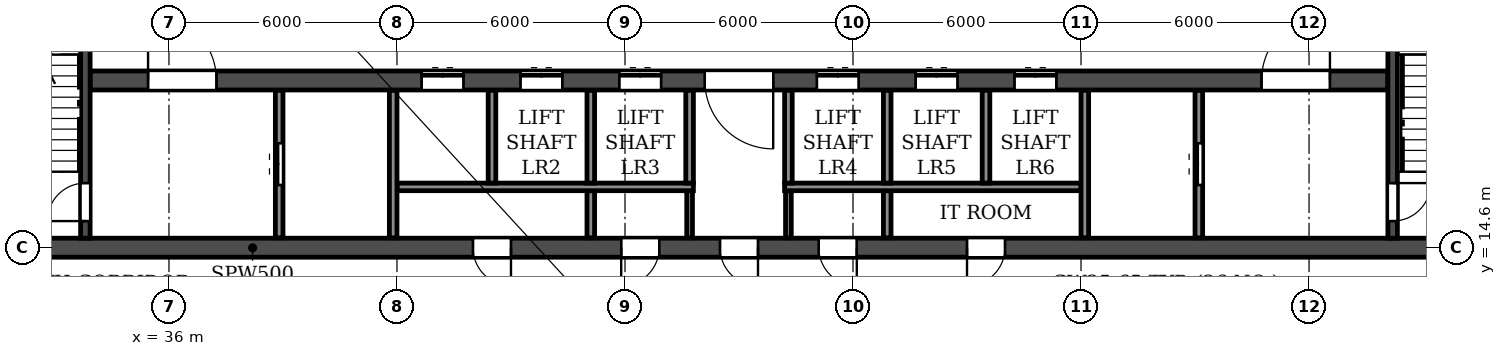
"""IFC4 building model, lengths in metres.
Left out: names, types, materials, properties, quantities, classifications, styles, units other than length and angle.
Written with IfcOpenShell. Run it as: python <this file> out.ifc"""

import sys

from ifc_helpers import new_model, si_unit, direction, frame, frame_2d, origin, place, context, subcontext, project, spatial, rectangle, extrude, element, fill, save


model = new_model("IFC4")
c1 = context("Model", 3, precision=1e-05, world=origin(), true_north=direction((0.0, 1.0)))
c2 = subcontext(c1, "Body", "Model", "MODEL_VIEW")
j1 = project(units=[si_unit("LENGTHUNIT", "METRE"), si_unit("PLANEANGLEUNIT", "RADIAN")], contexts=[c1])
p1 = place(None, origin())
s1 = spatial("IfcSite", under=j1, at=p1, CompositionType="ELEMENT")
p2 = place(p1, origin())
s2 = spatial("IfcBuilding", under=s1, at=p2, CompositionType="ELEMENT")
p3 = place(p2, frame((0.0, 0.0, 72.9)))
s3 = spatial("IfcBuildingStorey", under=s2, at=p3, CompositionType="ELEMENT", Elevation=72.9)
p4 = place(p3, frame((8.6, 14.6, 0.0), z_axis=(0.0, 0.0, 1.0), x_axis=(1.0, 0.0, 0.0)))
e1 = element("IfcWall", 1, at=p4, inside=s3, PredefinedType="SOLIDWALL", context=c2, shape_type="SweptSolid", body=[
    extrude(rectangle(XDim=84.8, YDim=0.5, at=frame_2d((42.4, 0.0))), origin(), (0.0, 0.0, 1.0), 3.06),
])
p5 = place(p4, frame((2.25, 0.0, 0.0)))
e2 = element("IfcOpeningElement", 2, at=p5, cuts=e1, PredefinedType="OPENING", context=c2, shape_type="SweptSolid", body=[
    extrude(rectangle(XDim=1.0, YDim=2.1, at=frame_2d((0.5, 1.05))), frame((0.0, 0.26, 0.0), z_axis=(0.0, -1.0, 0.0), x_axis=(1.0, 0.0, 0.0)), (0.0, 0.0, 1.0), 0.52),
])
p6 = place(p4, frame((6.95, 0.0, 0.0)))
e3 = element("IfcOpeningElement", 3, at=p6, cuts=e1, PredefinedType="OPENING", context=c2, shape_type="SweptSolid", body=[
    extrude(rectangle(XDim=1.0, YDim=2.1, at=frame_2d((0.5, 1.05))), frame((0.0, 0.26, 0.0), z_axis=(0.0, -1.0, 0.0), x_axis=(1.0, 0.0, 0.0)), (0.0, 0.0, 1.0), 0.52),
])
p7 = place(p4, frame((10.3, 0.0, 0.0)))
e4 = element("IfcOpeningElement", 4, at=p7, cuts=e1, PredefinedType="OPENING", context=c2, shape_type="SweptSolid", body=[
    extrude(rectangle(XDim=1.0, YDim=2.1, at=frame_2d((0.5, 1.05))), frame((0.0, 0.26, 0.0), z_axis=(0.0, -1.0, 0.0), x_axis=(1.0, 0.0, 0.0)), (0.0, 0.0, 1.0), 0.52),
])
p8 = place(p4, frame((18.2, 0.0, 0.0)))
e5 = element("IfcOpeningElement", 5, at=p8, cuts=e1, PredefinedType="OPENING", context=c2, shape_type="SweptSolid", body=[
    extrude(rectangle(XDim=1.0, YDim=2.1, at=frame_2d((0.5, 1.05))), frame((0.0, 0.26, 0.0), z_axis=(0.0, -1.0, 0.0), x_axis=(1.0, 0.0, 0.0)), (0.0, 0.0, 1.0), 0.52),
])
p9 = place(p4, frame((22.8, 0.0, 0.0)))
e6 = element("IfcOpeningElement", 6, at=p9, cuts=e1, PredefinedType="OPENING", context=c2, shape_type="SweptSolid", body=[
    extrude(rectangle(XDim=1.0, YDim=2.1, at=frame_2d((0.5, 1.05))), frame((0.0, 0.26, 0.0), z_axis=(0.0, -1.0, 0.0), x_axis=(1.0, 0.0, 0.0)), (0.0, 0.0, 1.0), 0.52),
])
p10 = place(p4, frame((35.4, 0.0, 0.0)))
e7 = element("IfcOpeningElement", 7, at=p10, cuts=e1, PredefinedType="OPENING", context=c2, shape_type="SweptSolid", body=[
    extrude(rectangle(XDim=1.0, YDim=2.1, at=frame_2d((0.5, 1.05))), frame((0.0, 0.26, 0.0), z_axis=(0.0, -1.0, 0.0), x_axis=(1.0, 0.0, 0.0)), (0.0, 0.0, 1.0), 0.52),
])
p11 = place(p4, frame((39.3, 0.0, 0.0)))
e8 = element("IfcOpeningElement", 8, at=p11, cuts=e1, PredefinedType="OPENING", context=c2, shape_type="SweptSolid", body=[
    extrude(rectangle(XDim=1.0, YDim=2.1, at=frame_2d((0.5, 1.05))), frame((0.0, 0.26, 0.0), z_axis=(0.0, -1.0, 0.0), x_axis=(1.0, 0.0, 0.0)), (0.0, 0.0, 1.0), 0.52),
])
p12 = place(p4, frame((41.9, 0.0, 0.0)))
e9 = element("IfcOpeningElement", 9, at=p12, cuts=e1, PredefinedType="OPENING", context=c2, shape_type="SweptSolid", body=[
    extrude(rectangle(XDim=1.0, YDim=2.1, at=frame_2d((0.5, 1.05))), frame((0.0, 0.26, 0.0), z_axis=(0.0, -1.0, 0.0), x_axis=(1.0, 0.0, 0.0)), (0.0, 0.0, 1.0), 0.52),
])
p13 = place(p4, frame((44.5, 0.0, 0.0)))
e10 = element("IfcOpeningElement", 10, at=p13, cuts=e1, PredefinedType="OPENING", context=c2, shape_type="SweptSolid", body=[
    extrude(rectangle(XDim=1.0, YDim=2.1, at=frame_2d((0.5, 1.05))), frame((0.0, 0.26, 0.0), z_axis=(0.0, -1.0, 0.0), x_axis=(1.0, 0.0, 0.0)), (0.0, 0.0, 1.0), 0.52),
])
p14 = place(p4, frame((48.4, 0.0, 0.0)))
e11 = element("IfcOpeningElement", 11, at=p14, cuts=e1, PredefinedType="OPENING", context=c2, shape_type="SweptSolid", body=[
    extrude(rectangle(XDim=1.0, YDim=2.1, at=frame_2d((0.5, 1.05))), frame((0.0, 0.26, 0.0), z_axis=(0.0, -1.0, 0.0), x_axis=(1.0, 0.0, 0.0)), (0.0, 0.0, 1.0), 0.52),
])
p15 = place(p4, frame((61.0, 0.0, 0.0)))
e12 = element("IfcOpeningElement", 12, at=p15, cuts=e1, PredefinedType="OPENING", context=c2, shape_type="SweptSolid", body=[
    extrude(rectangle(XDim=1.0, YDim=2.1, at=frame_2d((0.5, 1.05))), frame((0.0, 0.26, 0.0), z_axis=(0.0, -1.0, 0.0), x_axis=(1.0, 0.0, 0.0)), (0.0, 0.0, 1.0), 0.52),
])
p16 = place(p4, frame((65.6, 0.0, 0.0)))
e13 = element("IfcOpeningElement", 13, at=p16, cuts=e1, PredefinedType="OPENING", context=c2, shape_type="SweptSolid", body=[
    extrude(rectangle(XDim=1.0, YDim=2.1, at=frame_2d((0.5, 1.05))), frame((0.0, 0.26, 0.0), z_axis=(0.0, -1.0, 0.0), x_axis=(1.0, 0.0, 0.0)), (0.0, 0.0, 1.0), 0.52),
])
p17 = place(p4, frame((73.5, 0.0, 0.0)))
e14 = element("IfcOpeningElement", 14, at=p17, cuts=e1, PredefinedType="OPENING", context=c2, shape_type="SweptSolid", body=[
    extrude(rectangle(XDim=1.0, YDim=2.1, at=frame_2d((0.5, 1.05))), frame((0.0, 0.26, 0.0), z_axis=(0.0, -1.0, 0.0), x_axis=(1.0, 0.0, 0.0)), (0.0, 0.0, 1.0), 0.52),
])
p18 = place(p4, frame((76.55, 0.0, 0.0)))
e15 = element("IfcOpeningElement", 15, at=p18, cuts=e1, PredefinedType="OPENING", context=c2, shape_type="SweptSolid", body=[
    extrude(rectangle(XDim=1.0, YDim=2.1, at=frame_2d((0.5, 1.05))), frame((0.0, 0.26, 0.0), z_axis=(0.0, -1.0, 0.0), x_axis=(1.0, 0.0, 0.0)), (0.0, 0.0, 1.0), 0.52),
])
p19 = place(p4, frame((81.0, 0.0, 0.0)))
e16 = element("IfcOpeningElement", 16, at=p19, cuts=e1, PredefinedType="OPENING", context=c2, shape_type="SweptSolid", body=[
    extrude(rectangle(XDim=1.5, YDim=2.1, at=frame_2d((0.75, 1.05))), frame((0.0, 0.26, 0.0), z_axis=(0.0, -1.0, 0.0), x_axis=(1.0, 0.0, 0.0)), (0.0, 0.0, 1.0), 0.52),
])
p20 = place(p3, frame((33.925, 19.0, 0.0), z_axis=(0.0, 0.0, 1.0), x_axis=(1.0, 0.0, 0.0)))
e17 = element("IfcWall", 17, at=p20, inside=s3, PredefinedType="SOLIDWALL", context=c2, shape_type="SweptSolid", body=[
    extrude(rectangle(XDim=34.15, YDim=0.5, at=frame_2d((17.075, 0.0))), origin(), (0.0, 0.0, 1.0), 3.06),
])
p21 = place(p20, frame((16.175, 0.0, 0.0)))
e18 = element("IfcOpeningElement", 18, at=p21, cuts=e17, PredefinedType="OPENING", context=c2, shape_type="SweptSolid", body=[
    extrude(rectangle(XDim=1.8, YDim=2.1, at=frame_2d((0.9, 1.05))), frame((0.0, 0.26, 0.0), z_axis=(0.0, -1.0, 0.0), x_axis=(1.0, 0.0, 0.0)), (0.0, 0.0, 1.0), 0.52),
])
p22 = place(p20, frame((1.525, 0.0, 0.0)))
e19 = element("IfcOpeningElement", 19, at=p22, cuts=e17, PredefinedType="OPENING", context=c2, shape_type="SweptSolid", body=[
    extrude(rectangle(XDim=1.8, YDim=2.1, at=frame_2d((0.9, 1.05))), frame((0.0, 0.26, 0.0), z_axis=(0.0, -1.0, 0.0), x_axis=(1.0, 0.0, 0.0)), (0.0, 0.0, 1.0), 0.52),
])
p23 = place(p20, frame((8.725, 0.0, 0.0)))
e20 = element("IfcOpeningElement", 20, at=p23, cuts=e17, PredefinedType="OPENING", context=c2, shape_type="SweptSolid", body=[
    extrude(rectangle(XDim=1.1, YDim=2.1, at=frame_2d((0.55, 1.05))), frame((0.0, 0.26, 0.0), z_axis=(0.0, -1.0, 0.0), x_axis=(1.0, 0.0, 0.0)), (0.0, 0.0, 1.0), 0.52),
])
p24 = place(p20, frame((11.325, 0.0, 0.0)))
e21 = element("IfcOpeningElement", 21, at=p24, cuts=e17, PredefinedType="OPENING", context=c2, shape_type="SweptSolid", body=[
    extrude(rectangle(XDim=1.1, YDim=2.1, at=frame_2d((0.55, 1.05))), frame((0.0, 0.26, 0.0), z_axis=(0.0, -1.0, 0.0), x_axis=(1.0, 0.0, 0.0)), (0.0, 0.0, 1.0), 0.52),
])
p25 = place(p20, frame((13.925, 0.0, 0.0)))
e22 = element("IfcOpeningElement", 22, at=p25, cuts=e17, PredefinedType="OPENING", context=c2, shape_type="SweptSolid", body=[
    extrude(rectangle(XDim=1.1, YDim=2.1, at=frame_2d((0.55, 1.05))), frame((0.0, 0.26, 0.0), z_axis=(0.0, -1.0, 0.0), x_axis=(1.0, 0.0, 0.0)), (0.0, 0.0, 1.0), 0.52),
])
p26 = place(p20, frame((19.125, 0.0, 0.0)))
e23 = element("IfcOpeningElement", 23, at=p26, cuts=e17, PredefinedType="OPENING", context=c2, shape_type="SweptSolid", body=[
    extrude(rectangle(XDim=1.1, YDim=2.1, at=frame_2d((0.55, 1.05))), frame((0.0, 0.26, 0.0), z_axis=(0.0, -1.0, 0.0), x_axis=(1.0, 0.0, 0.0)), (0.0, 0.0, 1.0), 0.52),
])
p27 = place(p20, frame((21.725, 0.0, 0.0)))
e24 = element("IfcOpeningElement", 24, at=p27, cuts=e17, PredefinedType="OPENING", context=c2, shape_type="SweptSolid", body=[
    extrude(rectangle(XDim=1.1, YDim=2.1, at=frame_2d((0.55, 1.05))), frame((0.0, 0.26, 0.0), z_axis=(0.0, -1.0, 0.0), x_axis=(1.0, 0.0, 0.0)), (0.0, 0.0, 1.0), 0.52),
])
p28 = place(p20, frame((24.325, 0.0, 0.0)))
e25 = element("IfcOpeningElement", 25, at=p28, cuts=e17, PredefinedType="OPENING", context=c2, shape_type="SweptSolid", body=[
    extrude(rectangle(XDim=1.1, YDim=2.1, at=frame_2d((0.55, 1.05))), frame((0.0, 0.26, 0.0), z_axis=(0.0, -1.0, 0.0), x_axis=(1.0, 0.0, 0.0)), (0.0, 0.0, 1.0), 0.52),
])
p29 = place(p20, frame((30.825, 0.0, 0.0)))
e26 = element("IfcOpeningElement", 26, at=p29, cuts=e17, PredefinedType="OPENING", context=c2, shape_type="SweptSolid", body=[
    extrude(rectangle(XDim=1.8, YDim=2.1, at=frame_2d((0.9, 1.05))), frame((0.0, 0.26, 0.0), z_axis=(0.0, -1.0, 0.0), x_axis=(1.0, 0.0, 0.0)), (0.0, 0.0, 1.0), 0.52),
])
p30 = place(p3, frame((33.8, 14.85, 0.0), z_axis=(0.0, 0.0, 1.0), x_axis=(0.0, 1.0, 0.0)))
e27 = element("IfcWall", 27, at=p30, inside=s3, PredefinedType="SOLIDWALL", context=c2, shape_type="SweptSolid", body=[
    extrude(rectangle(XDim=7.625, YDim=0.25, at=frame_2d((3.812, 0.0))), origin(), (0.0, 0.0, 1.0), 3.06),
])
p31 = place(p30, frame((0.45, 0.0, 0.0)))
e28 = element("IfcOpeningElement", 28, at=p31, cuts=e27, PredefinedType="OPENING", context=c2, shape_type="SweptSolid", body=[
    extrude(rectangle(XDim=1.0, YDim=2.1, at=frame_2d((0.5, 1.05))), frame((0.0, 0.135, 0.0), z_axis=(0.0, -1.0, 0.0), x_axis=(1.0, 0.0, 0.0)), (0.0, 0.0, 1.0), 0.27),
])
p32 = place(p3, frame((68.2, 14.85, 0.0), z_axis=(0.0, 0.0, 1.0), x_axis=(0.0, 1.0, 0.0)))
e29 = element("IfcWall", 29, at=p32, inside=s3, PredefinedType="SOLIDWALL", context=c2, shape_type="SweptSolid", body=[
    extrude(rectangle(XDim=7.625, YDim=0.25, at=frame_2d((3.812, 0.0))), origin(), (0.0, 0.0, 1.0), 3.06),
])
p33 = place(p32, frame((0.45, 0.0, 0.0)))
e30 = element("IfcOpeningElement", 30, at=p33, cuts=e29, PredefinedType="OPENING", context=c2, shape_type="SweptSolid", body=[
    extrude(rectangle(XDim=1.0, YDim=2.1, at=frame_2d((0.5, 1.05))), frame((0.0, 0.135, 0.0), z_axis=(0.0, -1.0, 0.0), x_axis=(1.0, 0.0, 0.0)), (0.0, 0.0, 1.0), 0.27),
])
for number, where, z_axis, x_axis in (
    (31, (49.7, 14.86, 0.0), (0.0, 0.0, 1.0), (0.0, 1.0, 0.0)),
    (32, (52.3, 14.86, 0.0), (0.0, 0.0, 1.0), (0.0, 1.0, 0.0)),
):
    element("IfcWall", number, at=place(p3, frame(where, z_axis=z_axis, x_axis=x_axis)), inside=s3, PredefinedType="PARTITIONING", context=c2, shape_type="SweptSolid", body=[
        extrude(rectangle(XDim=1.24, YDim=0.15, at=frame_2d((0.62, 0.0))), origin(), (0.0, 0.0, 1.0), 3.06),
    ])
for number, where, z_axis, x_axis in (
    (33, (47.1, 14.86, 0.0), (0.0, 0.0, 1.0), (0.0, 1.0, 0.0)),
    (34, (54.9, 14.86, 0.0), (0.0, 0.0, 1.0), (0.0, 1.0, 0.0)),
):
    element("IfcWall", number, at=place(p3, frame(where, z_axis=z_axis, x_axis=x_axis)), inside=s3, PredefinedType="PARTITIONING", context=c2, shape_type="SweptSolid", body=[
        extrude(rectangle(XDim=1.24, YDim=0.2, at=frame_2d((0.62, 0.0))), origin(), (0.0, 0.0, 1.0), 3.06),
    ])
for number, where, z_axis, x_axis in (
    (35, (42.0, 16.2, 0.0), (0.0, 0.0, 1.0), (1.0, 0.0, 0.0)),
    (36, (52.2, 16.2, 0.0), (0.0, 0.0, 1.0), (1.0, 0.0, 0.0)),
):
    element("IfcWall", number, at=place(p3, frame(where, z_axis=z_axis, x_axis=x_axis)), inside=s3, PredefinedType="PARTITIONING", context=c2, shape_type="SweptSolid", body=[
        extrude(rectangle(XDim=7.8, YDim=0.2, at=frame_2d((3.9, 0.0))), origin(), (0.0, 0.0, 1.0), 3.06),
    ])
p34 = place(p3, frame((38.9, 14.86, 0.0), z_axis=(0.0, 0.0, 1.0), x_axis=(0.0, 1.0, 0.0)))
e37 = element("IfcWall", 37, at=p34, inside=s3, PredefinedType="PARTITIONING", context=c2, shape_type="SweptSolid", body=[
    extrude(rectangle(XDim=3.88, YDim=0.2, at=frame_2d((1.94, 0.0))), origin(), (0.0, 0.0, 1.0), 3.06),
])
p35 = place(p34, frame((1.39, 0.0, 0.0)))
e38 = element("IfcOpeningElement", 38, at=p35, cuts=e37, PredefinedType="OPENING", context=c2, shape_type="SweptSolid", body=[
    extrude(rectangle(XDim=1.1, YDim=2.1, at=frame_2d((0.55, 1.05))), frame((0.0, 0.11, 0.0), z_axis=(0.0, -1.0, 0.0), x_axis=(1.0, 0.0, 0.0)), (0.0, 0.0, 1.0), 0.22),
])
p36 = place(p3, frame((41.9, 14.86, 0.0), z_axis=(0.0, 0.0, 1.0), x_axis=(0.0, 1.0, 0.0)))
e39 = element("IfcWall", 39, at=p36, inside=s3, PredefinedType="PARTITIONING", context=c2, shape_type="SweptSolid", body=[
    extrude(rectangle(XDim=3.88, YDim=0.2, at=frame_2d((1.94, 0.0))), origin(), (0.0, 0.0, 1.0), 3.06),
])
for number, where, z_axis, x_axis in (
    (40, (44.5, 16.3, 0.0), (0.0, 0.0, 1.0), (0.0, 1.0, 0.0)),
    (41, (47.1, 16.3, 0.0), (0.0, 0.0, 1.0), (0.0, 1.0, 0.0)),
    (42, (49.7, 16.3, 0.0), (0.0, 0.0, 1.0), (0.0, 1.0, 0.0)),
    (43, (52.3, 16.3, 0.0), (0.0, 0.0, 1.0), (0.0, 1.0, 0.0)),
    (44, (54.9, 16.3, 0.0), (0.0, 0.0, 1.0), (0.0, 1.0, 0.0)),
    (45, (57.5, 16.3, 0.0), (0.0, 0.0, 1.0), (0.0, 1.0, 0.0)),
):
    element("IfcWall", number, at=place(p3, frame(where, z_axis=z_axis, x_axis=x_axis)), inside=s3, PredefinedType="PARTITIONING", context=c2, shape_type="SweptSolid", body=[
        extrude(rectangle(XDim=2.44, YDim=0.2, at=frame_2d((1.22, 0.0))), origin(), (0.0, 0.0, 1.0), 3.06),
    ])
p37 = place(p3, frame((60.1, 14.86, 0.0), z_axis=(0.0, 0.0, 1.0), x_axis=(0.0, 1.0, 0.0)))
e46 = element("IfcWall", 46, at=p37, inside=s3, PredefinedType="PARTITIONING", context=c2, shape_type="SweptSolid", body=[
    extrude(rectangle(XDim=3.88, YDim=0.2, at=frame_2d((1.94, 0.0))), origin(), (0.0, 0.0, 1.0), 3.06),
])
p38 = place(p3, frame((63.1, 14.86, 0.0), z_axis=(0.0, 0.0, 1.0), x_axis=(0.0, 1.0, 0.0)))
e47 = element("IfcWall", 47, at=p38, inside=s3, PredefinedType="PARTITIONING", context=c2, shape_type="SweptSolid", body=[
    extrude(rectangle(XDim=3.88, YDim=0.2, at=frame_2d((1.94, 0.0))), origin(), (0.0, 0.0, 1.0), 3.06),
])
p39 = place(p38, frame((1.39, 0.0, 0.0)))
e48 = element("IfcOpeningElement", 48, at=p39, cuts=e47, PredefinedType="OPENING", context=c2, shape_type="SweptSolid", body=[
    extrude(rectangle(XDim=1.1, YDim=2.1, at=frame_2d((0.55, 1.05))), frame((0.0, 0.11, 0.0), z_axis=(0.0, -1.0, 0.0), x_axis=(1.0, 0.0, 0.0)), (0.0, 0.0, 1.0), 0.22),
])
p40 = place(p10, frame((1.0, 0.0, 0.0), z_axis=(0.0, 0.0, 1.0), x_axis=(-1.0, 0.0, 0.0)))
e49 = element("IfcDoor", 49, at=p40, inside=s3, OperationType="SINGLE_SWING_LEFT", PredefinedType="DOOR", context=c2, shape_type="SweptSolid", body=[
    extrude(rectangle(XDim=1.0, YDim=2.1, at=frame_2d((0.5, 1.05))), frame((0.0, 0.025, 0.0), z_axis=(0.0, -1.0, 0.0), x_axis=(1.0, 0.0, 0.0)), (0.0, 0.0, 1.0), 0.05),
])
fill(e7, e49)
p41 = place(p11, frame((1.0, 0.0, 0.0), z_axis=(0.0, 0.0, 1.0), x_axis=(-1.0, 0.0, 0.0)))
e50 = element("IfcDoor", 50, at=p41, inside=s3, OperationType="SINGLE_SWING_RIGHT", PredefinedType="DOOR", context=c2, shape_type="SweptSolid", body=[
    extrude(rectangle(XDim=1.0, YDim=2.1, at=frame_2d((0.5, 1.05))), frame((0.0, 0.025, 0.0), z_axis=(0.0, -1.0, 0.0), x_axis=(1.0, 0.0, 0.0)), (0.0, 0.0, 1.0), 0.05),
])
fill(e8, e50)
p42 = place(p12, frame((1.0, 0.0, 0.0), z_axis=(0.0, 0.0, 1.0), x_axis=(-1.0, 0.0, 0.0)))
e51 = element("IfcDoor", 51, at=p42, inside=s3, OperationType="SINGLE_SWING_LEFT", PredefinedType="DOOR", context=c2, shape_type="SweptSolid", body=[
    extrude(rectangle(XDim=1.0, YDim=2.1, at=frame_2d((0.5, 1.05))), frame((0.0, 0.025, 0.0), z_axis=(0.0, -1.0, 0.0), x_axis=(1.0, 0.0, 0.0)), (0.0, 0.0, 1.0), 0.05),
])
fill(e9, e51)
p43 = place(p13, frame((1.0, 0.0, 0.0), z_axis=(0.0, 0.0, 1.0), x_axis=(-1.0, 0.0, 0.0)))
e52 = element("IfcDoor", 52, at=p43, inside=s3, OperationType="SINGLE_SWING_LEFT", PredefinedType="DOOR", context=c2, shape_type="SweptSolid", body=[
    extrude(rectangle(XDim=1.0, YDim=2.1, at=frame_2d((0.5, 1.05))), frame((0.0, 0.025, 0.0), z_axis=(0.0, -1.0, 0.0), x_axis=(1.0, 0.0, 0.0)), (0.0, 0.0, 1.0), 0.05),
])
fill(e10, e52)
p44 = place(p14, frame((1.0, 0.0, 0.0), z_axis=(0.0, 0.0, 1.0), x_axis=(-1.0, 0.0, 0.0)))
e53 = element("IfcDoor", 53, at=p44, inside=s3, OperationType="SINGLE_SWING_RIGHT", PredefinedType="DOOR", context=c2, shape_type="SweptSolid", body=[
    extrude(rectangle(XDim=1.0, YDim=2.1, at=frame_2d((0.5, 1.05))), frame((0.0, 0.025, 0.0), z_axis=(0.0, -1.0, 0.0), x_axis=(1.0, 0.0, 0.0)), (0.0, 0.0, 1.0), 0.05),
])
fill(e11, e53)
p45 = place(p39, origin())
e54 = element("IfcDoor", 54, at=p45, inside=s3, OperationType="DOUBLE_DOOR_SLIDING", PredefinedType="DOOR", context=c2, shape_type="SweptSolid", body=[
    extrude(rectangle(XDim=1.1, YDim=2.1, at=frame_2d((0.55, 1.05))), frame((0.0, 0.025, 0.0), z_axis=(0.0, -1.0, 0.0), x_axis=(1.0, 0.0, 0.0)), (0.0, 0.0, 1.0), 0.05),
])
fill(e48, e54)
p46 = place(p33, frame((1.0, 0.0, 0.0), z_axis=(0.0, 0.0, 1.0), x_axis=(-1.0, 0.0, 0.0)))
e55 = element("IfcDoor", 55, at=p46, inside=s3, OperationType="SINGLE_SWING_LEFT", PredefinedType="DOOR", context=c2, shape_type="SweptSolid", body=[
    extrude(rectangle(XDim=1.0, YDim=2.1, at=frame_2d((0.5, 1.05))), frame((0.0, 0.025, 0.0), z_axis=(0.0, -1.0, 0.0), x_axis=(1.0, 0.0, 0.0)), (0.0, 0.0, 1.0), 0.05),
])
fill(e30, e55)
p47 = place(p31, origin())
e56 = element("IfcDoor", 56, at=p47, inside=s3, OperationType="SINGLE_SWING_LEFT", PredefinedType="DOOR", context=c2, shape_type="SweptSolid", body=[
    extrude(rectangle(XDim=1.0, YDim=2.1, at=frame_2d((0.5, 1.05))), frame((0.0, 0.025, 0.0), z_axis=(0.0, -1.0, 0.0), x_axis=(1.0, 0.0, 0.0)), (0.0, 0.0, 1.0), 0.05),
])
fill(e28, e56)
p48 = place(p35, origin())
e57 = element("IfcDoor", 57, at=p48, inside=s3, OperationType="DOUBLE_DOOR_SLIDING", PredefinedType="DOOR", context=c2, shape_type="SweptSolid", body=[
    extrude(rectangle(XDim=1.1, YDim=2.1, at=frame_2d((0.55, 1.05))), frame((0.0, 0.025, 0.0), z_axis=(0.0, -1.0, 0.0), x_axis=(1.0, 0.0, 0.0)), (0.0, 0.0, 1.0), 0.05),
])
fill(e38, e57)
p49 = place(p21, frame((1.8, 0.0, 0.0), z_axis=(0.0, 0.0, 1.0), x_axis=(-1.0, 0.0, 0.0)))
e58 = element("IfcDoor", 58, at=p49, inside=s3, OperationType="DOUBLE_DOOR_SINGLE_SWING", PredefinedType="DOOR", context=c2, shape_type="SweptSolid", body=[
    extrude(rectangle(XDim=1.8, YDim=2.1, at=frame_2d((0.9, 1.05))), frame((0.0, 0.025, 0.0), z_axis=(0.0, -1.0, 0.0), x_axis=(1.0, 0.0, 0.0)), (0.0, 0.0, 1.0), 0.05),
])
fill(e18, e58)
p50 = place(p22, origin())
e59 = element("IfcDoor", 59, at=p50, inside=s3, OperationType="DOUBLE_DOOR_SINGLE_SWING", PredefinedType="DOOR", context=c2, shape_type="SweptSolid", body=[
    extrude(rectangle(XDim=1.8, YDim=2.1, at=frame_2d((0.9, 1.05))), frame((0.0, 0.025, 0.0), z_axis=(0.0, -1.0, 0.0), x_axis=(1.0, 0.0, 0.0)), (0.0, 0.0, 1.0), 0.05),
])
fill(e19, e59)
p51 = place(p23, origin())
e60 = element("IfcDoor", 60, at=p51, inside=s3, OperationType="DOUBLE_DOOR_SLIDING", PredefinedType="DOOR", context=c2, shape_type="SweptSolid", body=[
    extrude(rectangle(XDim=1.1, YDim=2.1, at=frame_2d((0.55, 1.05))), frame((0.0, 0.025, 0.0), z_axis=(0.0, -1.0, 0.0), x_axis=(1.0, 0.0, 0.0)), (0.0, 0.0, 1.0), 0.05),
])
fill(e20, e60)
p52 = place(p24, origin())
e61 = element("IfcDoor", 61, at=p52, inside=s3, OperationType="DOUBLE_DOOR_SLIDING", PredefinedType="DOOR", context=c2, shape_type="SweptSolid", body=[
    extrude(rectangle(XDim=1.1, YDim=2.1, at=frame_2d((0.55, 1.05))), frame((0.0, 0.025, 0.0), z_axis=(0.0, -1.0, 0.0), x_axis=(1.0, 0.0, 0.0)), (0.0, 0.0, 1.0), 0.05),
])
fill(e21, e61)
p53 = place(p25, origin())
e62 = element("IfcDoor", 62, at=p53, inside=s3, OperationType="DOUBLE_DOOR_SLIDING", PredefinedType="DOOR", context=c2, shape_type="SweptSolid", body=[
    extrude(rectangle(XDim=1.1, YDim=2.1, at=frame_2d((0.55, 1.05))), frame((0.0, 0.025, 0.0), z_axis=(0.0, -1.0, 0.0), x_axis=(1.0, 0.0, 0.0)), (0.0, 0.0, 1.0), 0.05),
])
fill(e22, e62)
p54 = place(p26, origin())
e63 = element("IfcDoor", 63, at=p54, inside=s3, OperationType="DOUBLE_DOOR_SLIDING", PredefinedType="DOOR", context=c2, shape_type="SweptSolid", body=[
    extrude(rectangle(XDim=1.1, YDim=2.1, at=frame_2d((0.55, 1.05))), frame((0.0, 0.025, 0.0), z_axis=(0.0, -1.0, 0.0), x_axis=(1.0, 0.0, 0.0)), (0.0, 0.0, 1.0), 0.05),
])
fill(e23, e63)
p55 = place(p27, origin())
e64 = element("IfcDoor", 64, at=p55, inside=s3, OperationType="DOUBLE_DOOR_SLIDING", PredefinedType="DOOR", context=c2, shape_type="SweptSolid", body=[
    extrude(rectangle(XDim=1.1, YDim=2.1, at=frame_2d((0.55, 1.05))), frame((0.0, 0.025, 0.0), z_axis=(0.0, -1.0, 0.0), x_axis=(1.0, 0.0, 0.0)), (0.0, 0.0, 1.0), 0.05),
])
fill(e24, e64)
p56 = place(p28, origin())
e65 = element("IfcDoor", 65, at=p56, inside=s3, OperationType="DOUBLE_DOOR_SLIDING", PredefinedType="DOOR", context=c2, shape_type="SweptSolid", body=[
    extrude(rectangle(XDim=1.1, YDim=2.1, at=frame_2d((0.55, 1.05))), frame((0.0, 0.025, 0.0), z_axis=(0.0, -1.0, 0.0), x_axis=(1.0, 0.0, 0.0)), (0.0, 0.0, 1.0), 0.05),
])
fill(e25, e65)
p57 = place(p29, origin())
e66 = element("IfcDoor", 66, at=p57, inside=s3, OperationType="DOUBLE_DOOR_SINGLE_SWING", PredefinedType="DOOR", context=c2, shape_type="SweptSolid", body=[
    extrude(rectangle(XDim=1.8, YDim=2.1, at=frame_2d((0.9, 1.05))), frame((0.0, 0.025, 0.0), z_axis=(0.0, -1.0, 0.0), x_axis=(1.0, 0.0, 0.0)), (0.0, 0.0, 1.0), 0.05),
])
fill(e26, e66)
save(model, sys.argv[1])
